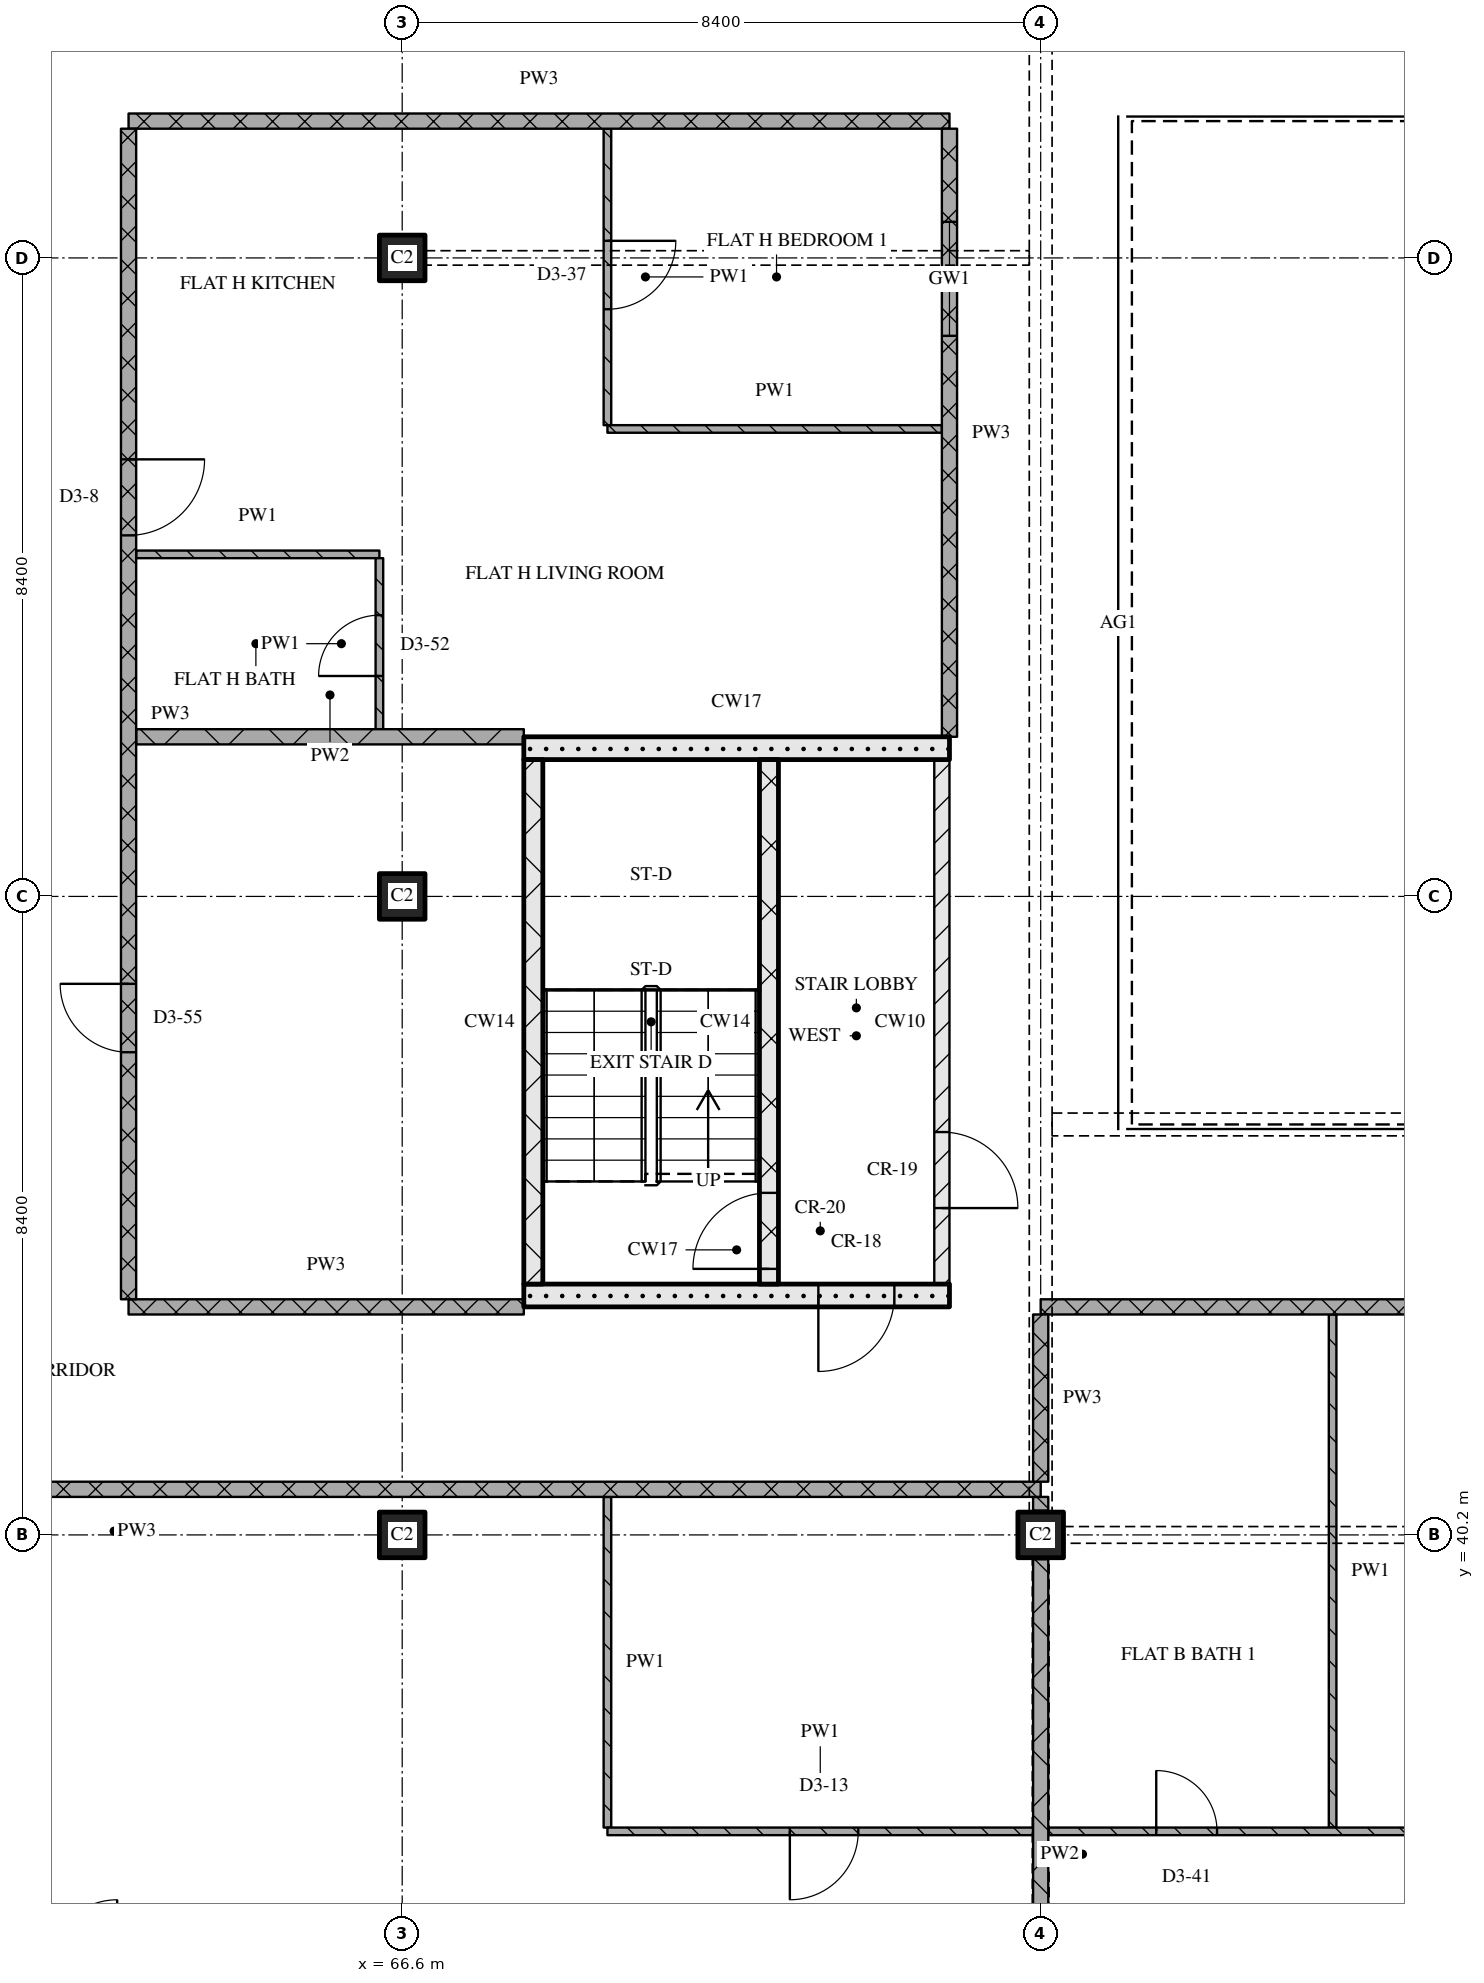
"""IFC4 building model, lengths in metres.
Left out: names, types, materials, properties, quantities, classifications, styles, units other than length and angle.
Written with IfcOpenShell. Run it as: python <this file> out.ifc"""

import sys

from ifc_helpers import new_model, si_unit, direction, frame, frame_2d, origin, origin_2d, place, context, subcontext, project, spatial, rectangle, extrude, element, fill, save


model = new_model("IFC4")
c1 = context("Model", 3, precision=1e-05, world=origin(), true_north=direction((0.0, 1.0)))
c2 = subcontext(c1, "Body", "Model", "MODEL_VIEW")
j1 = project(units=[si_unit("LENGTHUNIT", "METRE"), si_unit("PLANEANGLEUNIT", "RADIAN")], contexts=[c1])
p1 = place(None, origin())
s1 = spatial("IfcSite", under=j1, at=p1, CompositionType="ELEMENT")
p2 = place(p1, origin())
s2 = spatial("IfcBuilding", under=s1, at=p2, CompositionType="ELEMENT")
p3 = place(p2, frame((0.0, 0.0, 227.1)))
s3 = spatial("IfcBuildingStorey", under=s2, at=p3, CompositionType="ELEMENT", Elevation=227.1)
for number, where, z_axis, x_axis in (
    (1, (66.6, 40.2, 0.0), (0.0, 0.0, 1.0), (1.0, 0.0, 0.0)),
    (2, (66.6, 48.6, 0.0), (0.0, 0.0, 1.0), (1.0, 0.0, 0.0)),
    (3, (66.6, 57.0, 0.0), (0.0, 0.0, 1.0), (1.0, 0.0, 0.0)),
    (4, (75.0, 40.2, 0.0), (0.0, 0.0, 1.0), (1.0, 0.0, 0.0)),
):
    element("IfcColumn", number, at=place(p3, frame(where, z_axis=z_axis, x_axis=x_axis)), inside=s3, PredefinedType="COLUMN", context=c2, shape_type="SweptSolid", body=[
        extrude(rectangle(XDim=0.6, YDim=0.6, at=origin_2d()), origin(), (0.0, 0.0, 1.0), 3.6),
    ])
p4 = place(p3, frame((68.2, 43.35, 0.0), z_axis=(0.0, 0.0, 1.0), x_axis=(1.0, 0.0, 0.0)))
e5 = element("IfcWall", 5, at=p4, inside=s3, PredefinedType="SOLIDWALL", context=c2, shape_type="SweptSolid", body=[
    extrude(rectangle(XDim=5.6, YDim=0.3, at=frame_2d((2.8, 0.0))), origin(), (0.0, 0.0, 1.0), 3.32),
])
p5 = place(p4, frame((3.875, 0.0, 0.0)))
e6 = element("IfcOpeningElement", 6, at=p5, cuts=e5, PredefinedType="OPENING", context=c2, shape_type="SweptSolid", body=[
    extrude(rectangle(XDim=1.0, YDim=2.1, at=frame_2d((0.5, 1.05))), frame((0.0, 0.16, 0.0), z_axis=(0.0, -1.0, 0.0), x_axis=(1.0, 0.0, 0.0)), (0.0, 0.0, 1.0), 0.32),
])
p6 = place(p3, frame((68.325, 43.5, 0.0), z_axis=(0.0, 0.0, 1.0), x_axis=(0.0, 1.0, 0.0)))
e7 = element("IfcWall", 7, at=p6, inside=s3, PredefinedType="SOLIDWALL", context=c2, shape_type="SweptSolid", body=[
    extrude(rectangle(XDim=6.9, YDim=0.25, at=frame_2d((3.45, 0.0))), origin(), (0.0, 0.0, 1.0), 3.32),
])
p7 = place(p3, frame((71.425, 43.5, 0.0), z_axis=(0.0, 0.0, 1.0), x_axis=(0.0, 1.0, 0.0)))
e8 = element("IfcWall", 8, at=p7, inside=s3, PredefinedType="SOLIDWALL", context=c2, shape_type="SweptSolid", body=[
    extrude(rectangle(XDim=6.9, YDim=0.25, at=frame_2d((3.45, 0.0))), origin(), (0.0, 0.0, 1.0), 3.32),
])
p8 = place(p7, frame((0.2, 0.0, 0.0)))
e9 = element("IfcOpeningElement", 9, at=p8, cuts=e8, PredefinedType="OPENING", context=c2, shape_type="SweptSolid", body=[
    extrude(rectangle(XDim=1.0, YDim=2.1, at=frame_2d((0.5, 1.05))), frame((0.0, 0.135, 0.0), z_axis=(0.0, -1.0, 0.0), x_axis=(1.0, 0.0, 0.0)), (0.0, 0.0, 1.0), 0.27),
])
p9 = place(p3, frame((73.7, 43.5, 0.0), z_axis=(0.0, 0.0, 1.0), x_axis=(0.0, 1.0, 0.0)))
e10 = element("IfcWall", 10, at=p9, inside=s3, PredefinedType="PARTITIONING", context=c2, shape_type="SweptSolid", body=[
    extrude(rectangle(XDim=6.9, YDim=0.2, at=frame_2d((3.45, 0.0))), origin(), (0.0, 0.0, 1.0), 3.32),
])
p10 = place(p9, frame((1.0, 0.0, 0.0)))
e11 = element("IfcOpeningElement", 11, at=p10, cuts=e10, PredefinedType="OPENING", context=c2, shape_type="SweptSolid", body=[
    extrude(rectangle(XDim=1.0, YDim=2.1, at=frame_2d((0.5, 1.05))), frame((0.0, 0.11, 0.0), z_axis=(0.0, -1.0, 0.0), x_axis=(1.0, 0.0, 0.0)), (0.0, 0.0, 1.0), 0.22),
])
p11 = place(p3, frame((68.2, 50.55, 0.0), z_axis=(0.0, 0.0, 1.0), x_axis=(1.0, 0.0, 0.0)))
e12 = element("IfcWall", 12, at=p11, inside=s3, PredefinedType="SOLIDWALL", context=c2, shape_type="SweptSolid", body=[
    extrude(rectangle(XDim=5.6, YDim=0.3, at=frame_2d((2.8, 0.0))), origin(), (0.0, 0.0, 1.0), 3.32),
])
p12 = place(p3, frame((75.0, 40.8, 0.0), z_axis=(0.0, 0.0, 1.0), x_axis=(-1.0, 0.0, 0.0)))
e13 = element("IfcWall", 13, at=p12, inside=s3, PredefinedType="PARTITIONING", context=c2, shape_type="SweptSolid", body=[
    extrude(rectangle(XDim=24.38, YDim=0.2, at=frame_2d((12.19, 0.0))), origin(), (0.0, 0.0, 1.0), 3.32),
])
p13 = place(p12, frame((13.45, 0.0, 0.0)))
e14 = element("IfcOpeningElement", 14, at=p13, cuts=e13, PredefinedType="OPENING", context=c2, shape_type="SweptSolid", body=[
    extrude(rectangle(XDim=1.0, YDim=2.1, at=frame_2d((0.5, 1.05))), frame((0.0, 0.11, 0.0), z_axis=(0.0, -1.0, 0.0), x_axis=(1.0, 0.0, 0.0)), (0.0, 0.0, 1.0), 0.22),
])
p14 = place(p3, frame((63.0, 43.2, 0.0), z_axis=(0.0, 0.0, 1.0), x_axis=(1.0, 0.0, 0.0)))
e15 = element("IfcWall", 15, at=p14, inside=s3, PredefinedType="PARTITIONING", context=c2, shape_type="SweptSolid", body=[
    extrude(rectangle(XDim=5.2, YDim=0.2, at=frame_2d((2.6, 0.0))), origin(), (0.0, 0.0, 1.0), 3.32),
])
p15 = place(p3, frame((100.2, 43.2, 0.0), z_axis=(0.0, 0.0, 1.0), x_axis=(-1.0, 0.0, 0.0)))
e16 = element("IfcWall", 16, at=p15, inside=s3, PredefinedType="PARTITIONING", context=c2, shape_type="SweptSolid", body=[
    extrude(rectangle(XDim=25.2, YDim=0.2, at=frame_2d((12.6, 0.0))), origin(), (0.0, 0.0, 1.0), 3.32),
])
p16 = place(p15, frame((13.45, 0.0, 0.0)))
e17 = element("IfcOpeningElement", 17, at=p16, cuts=e16, PredefinedType="OPENING", context=c2, shape_type="SweptSolid", body=[
    extrude(rectangle(XDim=1.0, YDim=2.1, at=frame_2d((0.5, 1.05))), frame((0.0, 0.11, 0.0), z_axis=(0.0, -1.0, 0.0), x_axis=(1.0, 0.0, 0.0)), (0.0, 0.0, 1.0), 0.22),
])
p17 = place(p3, frame((63.1, 50.7, 0.0), z_axis=(0.0, 0.0, 1.0), x_axis=(1.0, 0.0, 0.0)))
e18 = element("IfcWall", 18, at=p17, inside=s3, PredefinedType="PARTITIONING", context=c2, shape_type="SweptSolid", body=[
    extrude(rectangle(XDim=5.1, YDim=0.2, at=frame_2d((2.55, 0.0))), origin(), (0.0, 0.0, 1.0), 3.32),
])
p18 = place(p3, frame((63.1, 53.1, 0.0), z_axis=(0.0, 0.0, 1.0), x_axis=(1.0, 0.0, 0.0)))
e19 = element("IfcWall", 19, at=p18, inside=s3, PredefinedType="PARTITIONING", context=c2, shape_type="SweptSolid", body=[
    extrude(rectangle(XDim=3.2, YDim=0.1, at=frame_2d((1.6, 0.0))), origin(), (0.0, 0.0, 1.0), 3.32),
])
p19 = place(p3, frame((69.3, 54.75, 0.0), z_axis=(0.0, 0.0, 1.0), x_axis=(1.0, 0.0, 0.0)))
e20 = element("IfcWall", 20, at=p19, inside=s3, PredefinedType="PARTITIONING", context=c2, shape_type="SweptSolid", body=[
    extrude(rectangle(XDim=4.4, YDim=0.1, at=frame_2d((2.2, 0.0))), origin(), (0.0, 0.0, 1.0), 3.32),
])
p20 = place(p3, frame((63.0, 58.8, 0.0), z_axis=(0.0, 0.0, 1.0), x_axis=(1.0, 0.0, 0.0)))
e21 = element("IfcWall", 21, at=p20, inside=s3, PredefinedType="PARTITIONING", context=c2, shape_type="SweptSolid", body=[
    extrude(rectangle(XDim=10.8, YDim=0.2, at=frame_2d((5.4, 0.0))), origin(), (0.0, 0.0, 1.0), 3.32),
])
p21 = place(p3, frame((63.0, 58.7, 0.0), z_axis=(0.0, 0.0, 1.0), x_axis=(0.0, -1.0, 0.0)))
e22 = element("IfcWall", 22, at=p21, inside=s3, PredefinedType="PARTITIONING", context=c2, shape_type="SweptSolid", body=[
    extrude(rectangle(XDim=15.4, YDim=0.2, at=frame_2d((7.7, 0.0))), origin(), (0.0, 0.0, 1.0), 3.32),
])
p22 = place(p21, frame((4.35, 0.0, 0.0)))
e23 = element("IfcOpeningElement", 23, at=p22, cuts=e22, PredefinedType="OPENING", context=c2, shape_type="SweptSolid", body=[
    extrude(rectangle(XDim=1.0, YDim=2.1, at=frame_2d((0.5, 1.05))), frame((0.0, 0.11, 0.0), z_axis=(0.0, -1.0, 0.0), x_axis=(1.0, 0.0, 0.0)), (0.0, 0.0, 1.0), 0.22),
])
p23 = place(p21, frame((11.25, 0.0, 0.0)))
e24 = element("IfcOpeningElement", 24, at=p23, cuts=e22, PredefinedType="OPENING", context=c2, shape_type="SweptSolid", body=[
    extrude(rectangle(XDim=0.9, YDim=2.1, at=frame_2d((0.45, 1.05))), frame((0.0, 0.11, 0.0), z_axis=(0.0, -1.0, 0.0), x_axis=(1.0, 0.0, 0.0)), (0.0, 0.0, 1.0), 0.22),
])
p24 = place(p3, frame((66.3, 50.8, 0.0), z_axis=(0.0, 0.0, 1.0), x_axis=(0.0, 1.0, 0.0)))
e25 = element("IfcWall", 25, at=p24, inside=s3, PredefinedType="PARTITIONING", context=c2, shape_type="SweptSolid", body=[
    extrude(rectangle(XDim=2.25, YDim=0.1, at=frame_2d((1.125, 0.0))), origin(), (0.0, 0.0, 1.0), 3.32),
])
p25 = place(p24, frame((0.7, 0.0, 0.0)))
e26 = element("IfcOpeningElement", 26, at=p25, cuts=e25, PredefinedType="OPENING", context=c2, shape_type="SweptSolid", body=[
    extrude(rectangle(XDim=0.8, YDim=2.1, at=frame_2d((0.4, 1.05))), frame((0.0, 0.06, 0.0), z_axis=(0.0, -1.0, 0.0), x_axis=(1.0, 0.0, 0.0)), (0.0, 0.0, 1.0), 0.12),
])
p26 = place(p3, frame((69.3, 40.7, 0.0), z_axis=(0.0, 0.0, 1.0), x_axis=(0.0, -1.0, 0.0)))
e27 = element("IfcWall", 27, at=p26, inside=s3, PredefinedType="PARTITIONING", context=c2, shape_type="SweptSolid", body=[
    extrude(rectangle(XDim=4.35, YDim=0.1, at=frame_2d((2.175, 0.0))), origin(), (0.0, 0.0, 1.0), 3.32),
])
p27 = place(p3, frame((69.3, 58.7, 0.0), z_axis=(0.0, 0.0, 1.0), x_axis=(0.0, -1.0, 0.0)))
e28 = element("IfcWall", 28, at=p27, inside=s3, PredefinedType="PARTITIONING", context=c2, shape_type="SweptSolid", body=[
    extrude(rectangle(XDim=3.9, YDim=0.1, at=frame_2d((1.95, 0.0))), origin(), (0.0, 0.0, 1.0), 3.32),
])
p28 = place(p27, frame((1.475, 0.0, 0.0)))
e29 = element("IfcOpeningElement", 29, at=p28, cuts=e28, PredefinedType="OPENING", context=c2, shape_type="SweptSolid", body=[
    extrude(rectangle(XDim=0.9, YDim=2.1, at=frame_2d((0.45, 1.05))), frame((0.0, 0.06, 0.0), z_axis=(0.0, -1.0, 0.0), x_axis=(1.0, 0.0, 0.0)), (0.0, 0.0, 1.0), 0.12),
])
p29 = place(p3, frame((73.8, 58.7, 0.0), z_axis=(0.0, 0.0, 1.0), x_axis=(0.0, -1.0, 0.0)))
e30 = element("IfcWall", 30, at=p29, inside=s3, PredefinedType="PARTITIONING", context=c2, shape_type="SweptSolid", body=[
    extrude(rectangle(XDim=8.0, YDim=0.2, at=frame_2d((4.0, 0.0))), origin(), (0.0, 0.0, 1.0), 3.32),
])
p30 = place(p29, frame((1.225, 0.0, 0.9)))
e31 = element("IfcOpeningElement", 31, at=p30, cuts=e30, PredefinedType="OPENING", context=c2, shape_type="SweptSolid", body=[
    extrude(rectangle(XDim=1.5, YDim=1.5, at=frame_2d((0.75, 0.75))), frame((0.0, 0.11, 0.0), z_axis=(0.0, -1.0, 0.0), x_axis=(1.0, 0.0, 0.0)), (0.0, 0.0, 1.0), 0.22),
])
p31 = place(p3, frame((75.0, 43.1, 0.0), z_axis=(0.0, 0.0, 1.0), x_axis=(0.0, -1.0, 0.0)))
e32 = element("IfcWall", 32, at=p31, inside=s3, PredefinedType="PARTITIONING", context=c2, shape_type="SweptSolid", body=[
    extrude(rectangle(XDim=2.2, YDim=0.2, at=frame_2d((1.1, 0.0))), origin(), (0.0, 0.0, 1.0), 2.53),
])
p32 = place(p3, frame((75.0, 39.88, 0.0), z_axis=(0.0, 0.0, 1.0), x_axis=(0.0, -1.0, 0.0)))
e33 = element("IfcWall", 33, at=p32, inside=s3, PredefinedType="PARTITIONING", context=c2, shape_type="SweptSolid", body=[
    extrude(rectangle(XDim=7.76, YDim=0.2, at=frame_2d((3.88, 0.0))), origin(), (0.0, 0.0, 1.0), 2.72),
])
p33 = place(p3, frame((75.0, 40.7, 0.0), z_axis=(0.0, 0.0, 1.0), x_axis=(0.0, -1.0, 0.0)))
e34 = element("IfcWall", 34, at=p33, inside=s3, PredefinedType="PARTITIONING", context=c2, shape_type="SweptSolid", body=[
    extrude(rectangle(XDim=0.18, YDim=0.2, at=frame_2d((0.09, 0.0))), origin(), (0.0, 0.0, 1.0), 3.32),
])
p34 = place(p3, frame((78.841, 43.1, 0.0), z_axis=(0.0, 0.0, 1.0), x_axis=(0.0, -1.0, 0.0)))
e35 = element("IfcWall", 35, at=p34, inside=s3, PredefinedType="PARTITIONING", context=c2, shape_type="SweptSolid", body=[
    extrude(rectangle(XDim=6.75, YDim=0.1, at=frame_2d((3.375, 0.0))), origin(), (0.0, 0.0, 1.0), 3.32),
])
p35 = place(p3, frame((69.3, 36.3, 0.0), z_axis=(0.0, 0.0, 1.0), x_axis=(1.0, 0.0, 0.0)))
e36 = element("IfcWall", 36, at=p35, inside=s3, PredefinedType="PARTITIONING", context=c2, shape_type="SweptSolid", body=[
    extrude(rectangle(XDim=5.6, YDim=0.1, at=frame_2d((2.8, 0.0))), origin(), (0.0, 0.0, 1.0), 3.32),
])
p36 = place(p35, frame((2.4, 0.0, 0.0)))
e37 = element("IfcOpeningElement", 37, at=p36, cuts=e36, PredefinedType="OPENING", context=c2, shape_type="SweptSolid", body=[
    extrude(rectangle(XDim=0.9, YDim=2.1, at=frame_2d((0.45, 1.05))), frame((0.0, 0.06, 0.0), z_axis=(0.0, -1.0, 0.0), x_axis=(1.0, 0.0, 0.0)), (0.0, 0.0, 1.0), 0.12),
])
p37 = place(p3, frame((75.1, 36.3, 0.0), z_axis=(0.0, 0.0, 1.0), x_axis=(1.0, 0.0, 0.0)))
e38 = element("IfcWall", 38, at=p37, inside=s3, PredefinedType="PARTITIONING", context=c2, shape_type="SweptSolid", body=[
    extrude(rectangle(XDim=10.4, YDim=0.1, at=frame_2d((5.2, 0.0))), origin(), (0.0, 0.0, 1.0), 3.32),
])
p38 = place(p37, frame((1.42, 0.0, 0.0)))
e39 = element("IfcOpeningElement", 39, at=p38, cuts=e38, PredefinedType="OPENING", context=c2, shape_type="SweptSolid", body=[
    extrude(rectangle(XDim=0.8, YDim=2.1, at=frame_2d((0.4, 1.05))), frame((0.0, 0.06, 0.0), z_axis=(0.0, -1.0, 0.0), x_axis=(1.0, 0.0, 0.0)), (0.0, 0.0, 1.0), 0.12),
])
p39 = place(p37, frame((5.261, 0.0, 0.0)))
e40 = element("IfcOpeningElement", 40, at=p39, cuts=e38, PredefinedType="OPENING", context=c2, shape_type="SweptSolid", body=[
    extrude(rectangle(XDim=0.8, YDim=2.1, at=frame_2d((0.4, 1.05))), frame((0.0, 0.06, 0.0), z_axis=(0.0, -1.0, 0.0), x_axis=(1.0, 0.0, 0.0)), (0.0, 0.0, 1.0), 0.12),
])
p40 = place(p37, frame((8.541, 0.0, 0.0)))
e41 = element("IfcOpeningElement", 41, at=p40, cuts=e38, PredefinedType="OPENING", context=c2, shape_type="SweptSolid", body=[
    extrude(rectangle(XDim=0.9, YDim=2.1, at=frame_2d((0.45, 1.05))), frame((0.0, 0.06, 0.0), z_axis=(0.0, -1.0, 0.0), x_axis=(1.0, 0.0, 0.0)), (0.0, 0.0, 1.0), 0.12),
])
p41 = place(p5, origin())
e42 = element("IfcDoor", 42, at=p41, inside=s3, OperationType="SINGLE_SWING_RIGHT", PredefinedType="DOOR", context=c2, shape_type="SweptSolid", body=[
    extrude(rectangle(XDim=1.0, YDim=2.1, at=frame_2d((0.5, 1.05))), frame((0.0, 0.025, 0.0), z_axis=(0.0, -1.0, 0.0), x_axis=(1.0, 0.0, 0.0)), (0.0, 0.0, 1.0), 0.05),
])
fill(e6, e42)
p42 = place(p8, origin())
e43 = element("IfcDoor", 43, at=p42, inside=s3, OperationType="SINGLE_SWING_LEFT", PredefinedType="DOOR", context=c2, shape_type="SweptSolid", body=[
    extrude(rectangle(XDim=1.0, YDim=2.1, at=frame_2d((0.5, 1.05))), frame((0.0, 0.025, 0.0), z_axis=(0.0, -1.0, 0.0), x_axis=(1.0, 0.0, 0.0)), (0.0, 0.0, 1.0), 0.05),
])
fill(e9, e43)
p43 = place(p10, origin())
e44 = element("IfcDoor", 44, at=p43, inside=s3, OperationType="SINGLE_SWING_RIGHT", PredefinedType="DOOR", context=c2, shape_type="SweptSolid", body=[
    extrude(rectangle(XDim=1.0, YDim=2.1, at=frame_2d((0.5, 1.05))), frame((0.0, 0.025, 0.0), z_axis=(0.0, -1.0, 0.0), x_axis=(1.0, 0.0, 0.0)), (0.0, 0.0, 1.0), 0.05),
])
fill(e11, e44)
p44 = place(p22, origin())
e45 = element("IfcDoor", 45, at=p44, inside=s3, OperationType="SINGLE_SWING_LEFT", PredefinedType="DOOR", context=c2, shape_type="SweptSolid", body=[
    extrude(rectangle(XDim=1.0, YDim=2.1, at=frame_2d((0.5, 1.05))), frame((0.0, 0.025, 0.0), z_axis=(0.0, -1.0, 0.0), x_axis=(1.0, 0.0, 0.0)), (0.0, 0.0, 1.0), 0.05),
])
fill(e23, e45)
p45 = place(p23, origin())
e46 = element("IfcDoor", 46, at=p45, inside=s3, OperationType="SINGLE_SWING_RIGHT", PredefinedType="DOOR", context=c2, shape_type="SweptSolid", body=[
    extrude(rectangle(XDim=0.9, YDim=2.1, at=frame_2d((0.45, 1.05))), frame((0.0, 0.025, 0.0), z_axis=(0.0, -1.0, 0.0), x_axis=(1.0, 0.0, 0.0)), (0.0, 0.0, 1.0), 0.05),
])
fill(e24, e46)
p46 = place(p25, origin())
e47 = element("IfcDoor", 47, at=p46, inside=s3, OperationType="SINGLE_SWING_LEFT", PredefinedType="DOOR", context=c2, shape_type="SweptSolid", body=[
    extrude(rectangle(XDim=0.8, YDim=2.1, at=frame_2d((0.4, 1.05))), frame((0.0, 0.025, 0.0), z_axis=(0.0, -1.0, 0.0), x_axis=(1.0, 0.0, 0.0)), (0.0, 0.0, 1.0), 0.05),
])
fill(e26, e47)
p47 = place(p28, origin())
e48 = element("IfcDoor", 48, at=p47, inside=s3, OperationType="SINGLE_SWING_LEFT", PredefinedType="DOOR", context=c2, shape_type="SweptSolid", body=[
    extrude(rectangle(XDim=0.9, YDim=2.1, at=frame_2d((0.45, 1.05))), frame((0.0, 0.025, 0.0), z_axis=(0.0, -1.0, 0.0), x_axis=(1.0, 0.0, 0.0)), (0.0, 0.0, 1.0), 0.05),
])
fill(e29, e48)
p48 = place(p36, origin())
e49 = element("IfcDoor", 49, at=p48, inside=s3, OperationType="SINGLE_SWING_RIGHT", PredefinedType="DOOR", context=c2, shape_type="SweptSolid", body=[
    extrude(rectangle(XDim=0.9, YDim=2.1, at=frame_2d((0.45, 1.05))), frame((0.0, 0.025, 0.0), z_axis=(0.0, -1.0, 0.0), x_axis=(1.0, 0.0, 0.0)), (0.0, 0.0, 1.0), 0.05),
])
fill(e37, e49)
p49 = place(p38, origin())
e50 = element("IfcDoor", 50, at=p49, inside=s3, OperationType="SINGLE_SWING_LEFT", PredefinedType="DOOR", context=c2, shape_type="SweptSolid", body=[
    extrude(rectangle(XDim=0.8, YDim=2.1, at=frame_2d((0.4, 1.05))), frame((0.0, 0.025, 0.0), z_axis=(0.0, -1.0, 0.0), x_axis=(1.0, 0.0, 0.0)), (0.0, 0.0, 1.0), 0.05),
])
fill(e39, e50)
p50 = place(p30, origin())
e51 = element("IfcWindow", 51, at=p50, inside=s3, PartitioningType="SINGLE_PANEL", PredefinedType="WINDOW", context=c2, shape_type="SweptSolid", body=[
    extrude(rectangle(XDim=1.5, YDim=1.5, at=frame_2d((0.75, 0.75))), frame((0.0, 0.03, 0.0), z_axis=(0.0, -1.0, 0.0), x_axis=(1.0, 0.0, 0.0)), (0.0, 0.0, 1.0), 0.06),
])
fill(e31, e51)
save(model, sys.argv[1])
